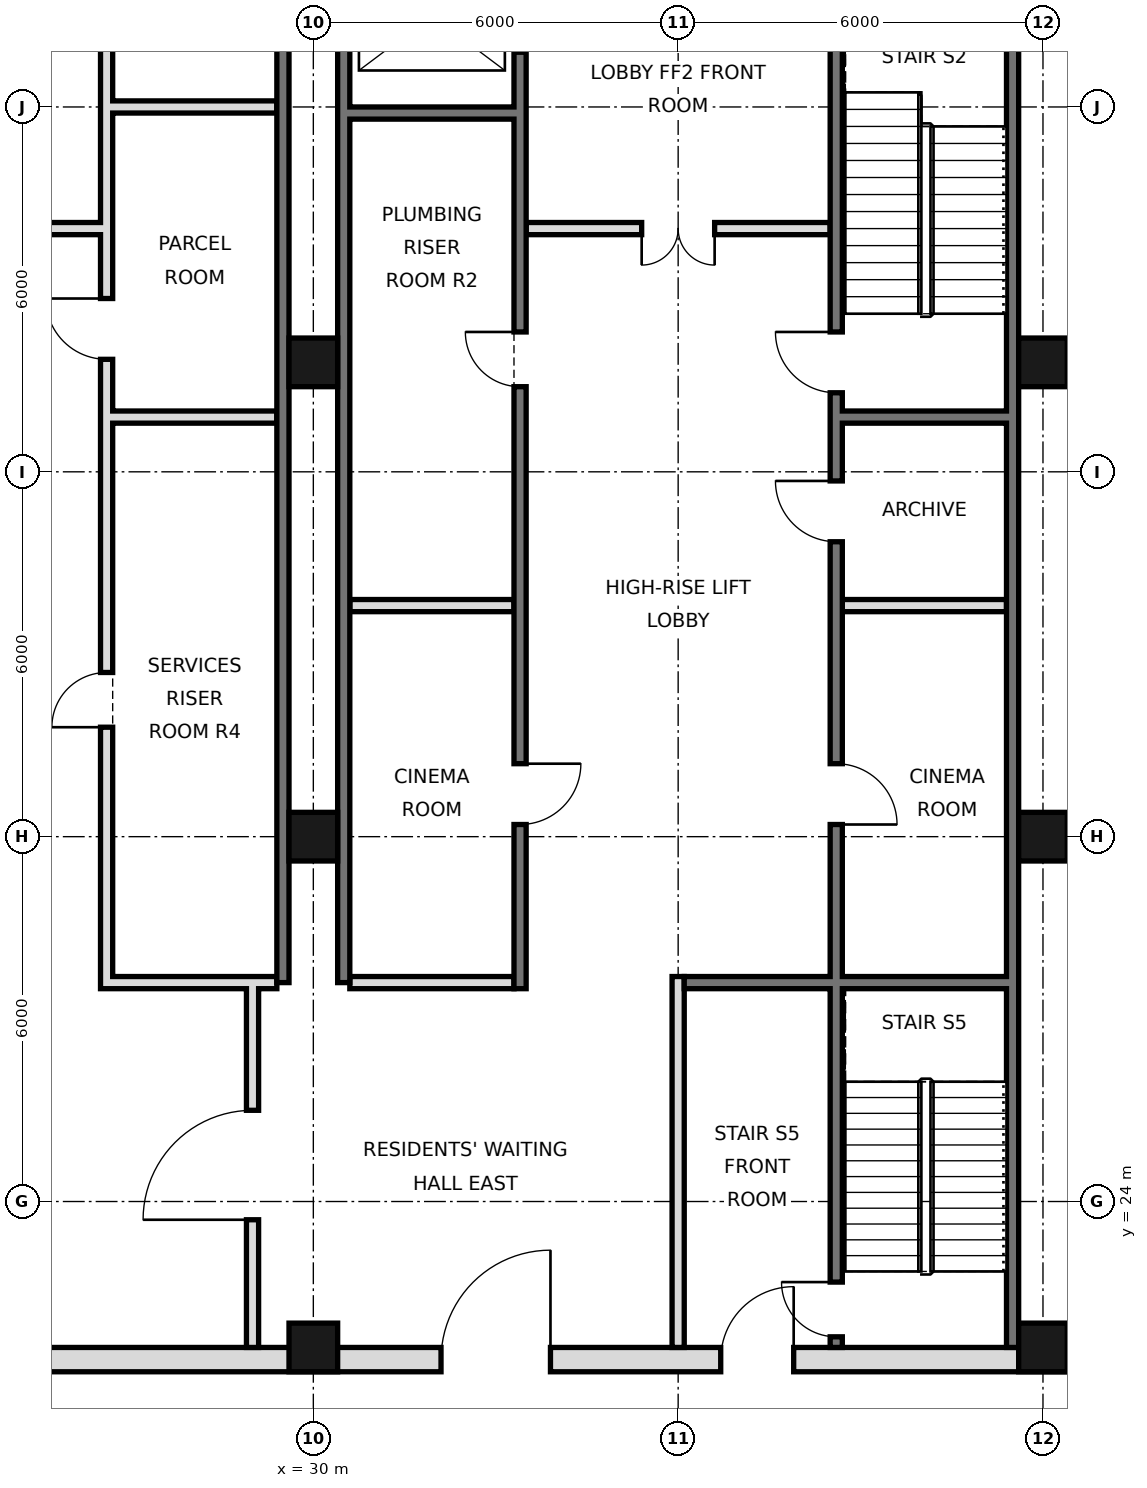
"""IFC4 building model, lengths in metres.
Left out: names, types, materials, properties, quantities, classifications, styles, units other than length and angle.
Written with IfcOpenShell. Run it as: python <this file> out.ifc"""

import sys

from ifc_helpers import new_model, si_unit, direction, frame, frame_2d, origin, origin_2d, place, context, subcontext, project, spatial, rectangle, hollow_rectangle, extrude, element, fill, save


model = new_model("IFC4")
c1 = context("Model", 3, precision=1e-05, world=origin(), true_north=direction((0.0, 1.0)))
c2 = subcontext(c1, "Body", "Model", "MODEL_VIEW")
j1 = project(units=[si_unit("LENGTHUNIT", "METRE"), si_unit("PLANEANGLEUNIT", "RADIAN")], contexts=[c1])
p1 = place(None, origin())
s1 = spatial("IfcSite", under=j1, at=p1, CompositionType="ELEMENT")
p2 = place(p1, origin())
s2 = spatial("IfcBuilding", under=s1, at=p2, CompositionType="ELEMENT")
p3 = place(p2, frame((0.0, 0.0, 85.8)))
s3 = spatial("IfcBuildingStorey", under=s2, at=p3, CompositionType="ELEMENT", Elevation=85.8)
for number, where, z_axis, x_axis in (
    (1, (30.0, 21.6, 0.0), (0.0, 0.0, 1.0), (1.0, 0.0, 0.0)),
    (2, (30.0, 30.0, 0.0), (0.0, 0.0, 1.0), (1.0, 0.0, 0.0)),
    (3, (30.0, 37.8, 0.0), (0.0, 0.0, 1.0), (1.0, 0.0, 0.0)),
    (4, (42.0, 21.6, 0.0), (0.0, 0.0, 1.0), (1.0, 0.0, 0.0)),
    (5, (42.0, 30.0, 0.0), (0.0, 0.0, 1.0), (1.0, 0.0, 0.0)),
    (6, (42.0, 37.8, 0.0), (0.0, 0.0, 1.0), (1.0, 0.0, 0.0)),
):
    element("IfcColumn", number, at=place(p3, frame(where, z_axis=z_axis, x_axis=x_axis)), inside=s3, PredefinedType="COLUMN", context=c2, shape_type="SweptSolid", body=[
        extrude(hollow_rectangle(XDim=0.8, YDim=0.8, WallThickness=0.06, at=origin_2d()), origin(), (0.0, 0.0, 1.0), 4.4),
    ])
p4 = place(p3, frame((41.5, 21.6, 0.0), z_axis=(0.0, 0.0, 1.0), x_axis=(0.0, 1.0, 0.0)))
e7 = element("IfcWall", 7, at=p4, inside=s3, PredefinedType="SOLIDWALL", context=c2, shape_type="SweptSolid", body=[
    extrude(rectangle(XDim=23.5, YDim=0.2, at=frame_2d((11.75, 0.0))), origin(), (0.0, 0.0, 1.0), 4.1),
])
for number, where, z_axis, x_axis in (
    (8, (29.5, 27.6, 0.0), (0.0, 0.0, 1.0), (0.0, 1.0, 0.0)),
    (9, (30.5, 27.6, 0.0), (0.0, 0.0, 1.0), (0.0, 1.0, 0.0)),
):
    element("IfcWall", number, at=place(p3, frame(where, z_axis=z_axis, x_axis=x_axis)), inside=s3, PredefinedType="SOLIDWALL", context=c2, shape_type="SweptSolid", body=[
        extrude(rectangle(XDim=17.5, YDim=0.2, at=frame_2d((8.75, 0.0))), origin(), (0.0, 0.0, 1.0), 4.1),
    ])
p5 = place(p3, frame((5.6, 21.4, 0.0), z_axis=(0.0, 0.0, 1.0), x_axis=(1.0, 0.0, 0.0)))
e10 = element("IfcWall", 10, at=p5, inside=s3, PredefinedType="SOLIDWALL", context=c2, shape_type="SweptSolid", body=[
    extrude(rectangle(XDim=36.8, YDim=0.4, at=frame_2d((18.4, 0.0))), origin(), (0.0, 0.0, 1.0), 4.1),
])
p6 = place(p5, frame((8.5, 0.0, 0.0)))
e11 = element("IfcOpeningElement", 11, at=p6, cuts=e10, PredefinedType="OPENING", context=c2, shape_type="SweptSolid", body=[
    extrude(rectangle(XDim=1.8, YDim=2.1, at=frame_2d((0.9, 1.05))), frame((0.0, 0.21, 0.0), z_axis=(0.0, -1.0, 0.0), x_axis=(1.0, 0.0, 0.0)), (0.0, 0.0, 1.0), 0.42),
])
p7 = place(p5, frame((17.5, 0.0, 0.0)))
e12 = element("IfcOpeningElement", 12, at=p7, cuts=e10, PredefinedType="OPENING", context=c2, shape_type="SweptSolid", body=[
    extrude(rectangle(XDim=1.8, YDim=2.1, at=frame_2d((0.9, 1.05))), frame((0.0, 0.21, 0.0), z_axis=(0.0, -1.0, 0.0), x_axis=(1.0, 0.0, 0.0)), (0.0, 0.0, 1.0), 0.42),
])
p8 = place(p5, frame((26.5, 0.0, 0.0)))
e13 = element("IfcOpeningElement", 13, at=p8, cuts=e10, PredefinedType="OPENING", context=c2, shape_type="SweptSolid", body=[
    extrude(rectangle(XDim=1.8, YDim=2.1, at=frame_2d((0.9, 1.05))), frame((0.0, 0.21, 0.0), z_axis=(0.0, -1.0, 0.0), x_axis=(1.0, 0.0, 0.0)), (0.0, 0.0, 1.0), 0.42),
])
p9 = place(p5, frame((4.5, 0.0, 0.0)))
e14 = element("IfcOpeningElement", 14, at=p9, cuts=e10, PredefinedType="OPENING", context=c2, shape_type="SweptSolid", body=[
    extrude(rectangle(XDim=1.2, YDim=2.1, at=frame_2d((0.6, 1.05))), frame((0.0, 0.21, 0.0), z_axis=(0.0, -1.0, 0.0), x_axis=(1.0, 0.0, 0.0)), (0.0, 0.0, 1.0), 0.42),
])
p10 = place(p5, frame((31.1, 0.0, 0.0)))
e15 = element("IfcOpeningElement", 15, at=p10, cuts=e10, PredefinedType="OPENING", context=c2, shape_type="SweptSolid", body=[
    extrude(rectangle(XDim=1.2, YDim=2.1, at=frame_2d((0.6, 1.05))), frame((0.0, 0.21, 0.0), z_axis=(0.0, -1.0, 0.0), x_axis=(1.0, 0.0, 0.0)), (0.0, 0.0, 1.0), 0.42),
])
p11 = place(p3, frame((29.0, 21.6, 0.0), z_axis=(0.0, 0.0, 1.0), x_axis=(0.0, 1.0, 0.0)))
e16 = element("IfcWall", 16, at=p11, inside=s3, PredefinedType="PARTITIONING", context=c2, shape_type="SweptSolid", body=[
    extrude(rectangle(XDim=6.0, YDim=0.2, at=frame_2d((3.0, 0.0))), origin(), (0.0, 0.0, 1.0), 4.1),
])
p12 = place(p11, frame((2.1, 0.0, 0.0)))
e17 = element("IfcOpeningElement", 17, at=p12, cuts=e16, PredefinedType="OPENING", context=c2, shape_type="SweptSolid", body=[
    extrude(rectangle(XDim=1.8, YDim=2.1, at=frame_2d((0.9, 1.05))), frame((0.0, 0.11, 0.0), z_axis=(0.0, -1.0, 0.0), x_axis=(1.0, 0.0, 0.0)), (0.0, 0.0, 1.0), 0.22),
])
p13 = place(p3, frame((26.6, 27.5, 0.0), z_axis=(0.0, 0.0, 1.0), x_axis=(0.0, 1.0, 0.0)))
e18 = element("IfcWall", 18, at=p13, inside=s3, PredefinedType="SOLIDWALL", context=c2, shape_type="SweptSolid", body=[
    extrude(rectangle(XDim=17.5, YDim=0.2, at=frame_2d((8.75, 0.0))), origin(), (0.0, 0.0, 1.0), 4.1),
])
p14 = place(p13, frame((4.3, 0.0, 0.0)))
e19 = element("IfcOpeningElement", 19, at=p14, cuts=e18, PredefinedType="OPENING", context=c2, shape_type="SweptSolid", body=[
    extrude(rectangle(XDim=0.9, YDim=2.1, at=frame_2d((0.45, 1.05))), frame((0.0, 0.11, 0.0), z_axis=(0.0, -1.0, 0.0), x_axis=(1.0, 0.0, 0.0)), (0.0, 0.0, 1.0), 0.22),
])
p15 = place(p13, frame((10.35, 0.0, 0.0)))
e20 = element("IfcOpeningElement", 20, at=p15, cuts=e18, PredefinedType="OPENING", context=c2, shape_type="SweptSolid", body=[
    extrude(rectangle(XDim=1.0, YDim=2.1, at=frame_2d((0.5, 1.05))), frame((0.0, 0.11, 0.0), z_axis=(0.0, -1.0, 0.0), x_axis=(1.0, 0.0, 0.0)), (0.0, 0.0, 1.0), 0.22),
])
p16 = place(p13, frame((15.475, 0.0, 0.0)))
e21 = element("IfcOpeningElement", 21, at=p16, cuts=e18, PredefinedType="OPENING", context=c2, shape_type="SweptSolid", body=[
    extrude(rectangle(XDim=1.0, YDim=2.1, at=frame_2d((0.5, 1.05))), frame((0.0, 0.11, 0.0), z_axis=(0.0, -1.0, 0.0), x_axis=(1.0, 0.0, 0.0)), (0.0, 0.0, 1.0), 0.22),
])
p17 = place(p3, frame((33.4, 27.5, 0.0), z_axis=(0.0, 0.0, 1.0), x_axis=(0.0, 1.0, 0.0)))
e22 = element("IfcWall", 22, at=p17, inside=s3, PredefinedType="SOLIDWALL", context=c2, shape_type="SweptSolid", body=[
    extrude(rectangle(XDim=17.5, YDim=0.2, at=frame_2d((8.75, 0.0))), origin(), (0.0, 0.0, 1.0), 4.1),
])
p18 = place(p17, frame((15.4, 0.0, 0.0)))
e23 = element("IfcOpeningElement", 23, at=p18, cuts=e22, PredefinedType="OPENING", context=c2, shape_type="SweptSolid", body=[
    extrude(rectangle(XDim=1.1, YDim=2.1, at=frame_2d((0.55, 1.05))), frame((0.0, 0.11, 0.0), z_axis=(0.0, -1.0, 0.0), x_axis=(1.0, 0.0, 0.0)), (0.0, 0.0, 1.0), 0.22),
])
p19 = place(p17, frame((2.7, 0.0, 0.0)))
e24 = element("IfcOpeningElement", 24, at=p19, cuts=e22, PredefinedType="OPENING", context=c2, shape_type="SweptSolid", body=[
    extrude(rectangle(XDim=1.0, YDim=2.1, at=frame_2d((0.5, 1.05))), frame((0.0, 0.11, 0.0), z_axis=(0.0, -1.0, 0.0), x_axis=(1.0, 0.0, 0.0)), (0.0, 0.0, 1.0), 0.22),
])
p20 = place(p17, frame((9.9, 0.0, 0.0)))
e25 = element("IfcOpeningElement", 25, at=p20, cuts=e22, PredefinedType="OPENING", context=c2, shape_type="SweptSolid", body=[
    extrude(rectangle(XDim=0.9, YDim=2.1, at=frame_2d((0.45, 1.05))), frame((0.0, 0.11, 0.0), z_axis=(0.0, -1.0, 0.0), x_axis=(1.0, 0.0, 0.0)), (0.0, 0.0, 1.0), 0.22),
])
p21 = place(p3, frame((36.0, 21.6, 0.0), z_axis=(0.0, 0.0, 1.0), x_axis=(0.0, 1.0, 0.0)))
e26 = element("IfcWall", 26, at=p21, inside=s3, PredefinedType="PARTITIONING", context=c2, shape_type="SweptSolid", body=[
    extrude(rectangle(XDim=6.1, YDim=0.2, at=frame_2d((3.05, 0.0))), origin(), (0.0, 0.0, 1.0), 4.1),
])
p22 = place(p3, frame((38.6, 21.6, 0.0), z_axis=(0.0, 0.0, 1.0), x_axis=(0.0, 1.0, 0.0)))
e27 = element("IfcWall", 27, at=p22, inside=s3, PredefinedType="SOLIDWALL", context=c2, shape_type="SweptSolid", body=[
    extrude(rectangle(XDim=23.4, YDim=0.2, at=frame_2d((11.7, 0.0))), origin(), (0.0, 0.0, 1.0), 4.1),
])
p23 = place(p22, frame((8.6, 0.0, 0.0)))
e28 = element("IfcOpeningElement", 28, at=p23, cuts=e27, PredefinedType="OPENING", context=c2, shape_type="SweptSolid", body=[
    extrude(rectangle(XDim=1.0, YDim=2.1, at=frame_2d((0.5, 1.05))), frame((0.0, 0.11, 0.0), z_axis=(0.0, -1.0, 0.0), x_axis=(1.0, 0.0, 0.0)), (0.0, 0.0, 1.0), 0.22),
])
p24 = place(p22, frame((13.25, 0.0, 0.0)))
e29 = element("IfcOpeningElement", 29, at=p24, cuts=e27, PredefinedType="OPENING", context=c2, shape_type="SweptSolid", body=[
    extrude(rectangle(XDim=1.0, YDim=2.1, at=frame_2d((0.5, 1.05))), frame((0.0, 0.11, 0.0), z_axis=(0.0, -1.0, 0.0), x_axis=(1.0, 0.0, 0.0)), (0.0, 0.0, 1.0), 0.22),
])
p25 = place(p22, frame((15.7, 0.0, 0.0)))
e30 = element("IfcOpeningElement", 30, at=p25, cuts=e27, PredefinedType="OPENING", context=c2, shape_type="SweptSolid", body=[
    extrude(rectangle(XDim=1.0, YDim=2.1, at=frame_2d((0.5, 1.05))), frame((0.0, 0.11, 0.0), z_axis=(0.0, -1.0, 0.0), x_axis=(1.0, 0.0, 0.0)), (0.0, 0.0, 1.0), 0.22),
])
p26 = place(p22, frame((0.175, 0.0, 0.0)))
e31 = element("IfcOpeningElement", 31, at=p26, cuts=e27, PredefinedType="OPENING", context=c2, shape_type="SweptSolid", body=[
    extrude(rectangle(XDim=0.9, YDim=2.1, at=frame_2d((0.45, 1.05))), frame((0.0, 0.11, 0.0), z_axis=(0.0, -1.0, 0.0), x_axis=(1.0, 0.0, 0.0)), (0.0, 0.0, 1.0), 0.22),
])
p27 = place(p3, frame((26.7, 27.6, 0.0), z_axis=(0.0, 0.0, 1.0), x_axis=(1.0, 0.0, 0.0)))
e32 = element("IfcWall", 32, at=p27, inside=s3, PredefinedType="SOLIDWALL", context=c2, shape_type="SweptSolid", body=[
    extrude(rectangle(XDim=2.7, YDim=0.2, at=frame_2d((1.35, 0.0))), origin(), (0.0, 0.0, 1.0), 4.1),
])
p28 = place(p3, frame((30.6, 27.6, 0.0), z_axis=(0.0, 0.0, 1.0), x_axis=(1.0, 0.0, 0.0)))
e33 = element("IfcWall", 33, at=p28, inside=s3, PredefinedType="PARTITIONING", context=c2, shape_type="SweptSolid", body=[
    extrude(rectangle(XDim=2.7, YDim=0.2, at=frame_2d((1.35, 0.0))), origin(), (0.0, 0.0, 1.0), 4.1),
])
p29 = place(p3, frame((36.1, 27.6, 0.0), z_axis=(0.0, 0.0, 1.0), x_axis=(1.0, 0.0, 0.0)))
e34 = element("IfcWall", 34, at=p29, inside=s3, PredefinedType="SOLIDWALL", context=c2, shape_type="SweptSolid", body=[
    extrude(rectangle(XDim=5.3, YDim=0.2, at=frame_2d((2.65, 0.0))), origin(), (0.0, 0.0, 1.0), 4.1),
])
p30 = place(p3, frame((30.6, 33.8, 0.0), z_axis=(0.0, 0.0, 1.0), x_axis=(1.0, 0.0, 0.0)))
e35 = element("IfcWall", 35, at=p30, inside=s3, PredefinedType="SOLIDWALL", context=c2, shape_type="SweptSolid", body=[
    extrude(rectangle(XDim=2.7, YDim=0.2, at=frame_2d((1.35, 0.0))), origin(), (0.0, 0.0, 1.0), 4.1),
])
p31 = place(p3, frame((38.7, 33.8, 0.0), z_axis=(0.0, 0.0, 1.0), x_axis=(1.0, 0.0, 0.0)))
e36 = element("IfcWall", 36, at=p31, inside=s3, PredefinedType="PARTITIONING", context=c2, shape_type="SweptSolid", body=[
    extrude(rectangle(XDim=2.7, YDim=0.2, at=frame_2d((1.35, 0.0))), origin(), (0.0, 0.0, 1.0), 4.1),
])
for number, where, z_axis, x_axis in (
    (37, (26.7, 36.9, 0.0), (0.0, 0.0, 1.0), (1.0, 0.0, 0.0)),
    (38, (38.7, 36.9, 0.0), (0.0, 0.0, 1.0), (1.0, 0.0, 0.0)),
):
    element("IfcWall", number, at=place(p3, frame(where, z_axis=z_axis, x_axis=x_axis)), inside=s3, PredefinedType="SOLIDWALL", context=c2, shape_type="SweptSolid", body=[
        extrude(rectangle(XDim=2.7, YDim=0.2, at=frame_2d((1.35, 0.0))), origin(), (0.0, 0.0, 1.0), 4.1),
    ])
p32 = place(p3, frame((21.5, 40.0, 0.0), z_axis=(0.0, 0.0, 1.0), x_axis=(1.0, 0.0, 0.0)))
e39 = element("IfcWall", 39, at=p32, inside=s3, PredefinedType="PARTITIONING", context=c2, shape_type="SweptSolid", body=[
    extrude(rectangle(XDim=5.0, YDim=0.2, at=frame_2d((2.5, 0.0))), origin(), (0.0, 0.0, 1.0), 4.1),
])
p33 = place(p32, frame((1.9, 0.0, 0.0)))
e40 = element("IfcOpeningElement", 40, at=p33, cuts=e39, PredefinedType="OPENING", context=c2, shape_type="SweptSolid", body=[
    extrude(rectangle(XDim=1.2, YDim=2.1, at=frame_2d((0.6, 1.05))), frame((0.0, 0.11, 0.0), z_axis=(0.0, -1.0, 0.0), x_axis=(1.0, 0.0, 0.0)), (0.0, 0.0, 1.0), 0.22),
])
p34 = place(p3, frame((33.5, 40.0, 0.0), z_axis=(0.0, 0.0, 1.0), x_axis=(1.0, 0.0, 0.0)))
e41 = element("IfcWall", 41, at=p34, inside=s3, PredefinedType="PARTITIONING", context=c2, shape_type="SweptSolid", body=[
    extrude(rectangle(XDim=5.0, YDim=0.2, at=frame_2d((2.5, 0.0))), origin(), (0.0, 0.0, 1.0), 4.1),
])
p35 = place(p34, frame((1.9, 0.0, 0.0)))
e42 = element("IfcOpeningElement", 42, at=p35, cuts=e41, PredefinedType="OPENING", context=c2, shape_type="SweptSolid", body=[
    extrude(rectangle(XDim=1.2, YDim=2.1, at=frame_2d((0.6, 1.05))), frame((0.0, 0.11, 0.0), z_axis=(0.0, -1.0, 0.0), x_axis=(1.0, 0.0, 0.0)), (0.0, 0.0, 1.0), 0.22),
])
p36 = place(p3, frame((30.6, 41.9, 0.0), z_axis=(0.0, 0.0, 1.0), x_axis=(1.0, 0.0, 0.0)))
e43 = element("IfcWall", 43, at=p36, inside=s3, PredefinedType="SOLIDWALL", context=c2, shape_type="SweptSolid", body=[
    extrude(rectangle(XDim=2.7, YDim=0.2, at=frame_2d((1.35, 0.0))), origin(), (0.0, 0.0, 1.0), 4.1),
])
p37 = place(p3, frame((26.7, 42.0, 0.0), z_axis=(0.0, 0.0, 1.0), x_axis=(1.0, 0.0, 0.0)))
e44 = element("IfcWall", 44, at=p37, inside=s3, PredefinedType="PARTITIONING", context=c2, shape_type="SweptSolid", body=[
    extrude(rectangle(XDim=2.7, YDim=0.2, at=frame_2d((1.35, 0.0))), origin(), (0.0, 0.0, 1.0), 4.1),
])
p38 = place(p12, origin())
e45 = element("IfcDoor", 45, at=p38, inside=s3, OperationType="SINGLE_SWING_LEFT", PredefinedType="DOOR", context=c2, shape_type="SweptSolid", body=[
    extrude(rectangle(XDim=1.8, YDim=2.1, at=frame_2d((0.9, 1.05))), frame((0.0, 0.025, 0.0), z_axis=(0.0, -1.0, 0.0), x_axis=(1.0, 0.0, 0.0)), (0.0, 0.0, 1.0), 0.05),
])
fill(e17, e45)
p39 = place(p8, frame((1.8, 0.0, 0.0), z_axis=(0.0, 0.0, 1.0), x_axis=(-1.0, 0.0, 0.0)))
e46 = element("IfcDoor", 46, at=p39, inside=s3, OperationType="SINGLE_SWING_LEFT", PredefinedType="DOOR", context=c2, shape_type="SweptSolid", body=[
    extrude(rectangle(XDim=1.8, YDim=2.1, at=frame_2d((0.9, 1.05))), frame((0.0, 0.025, 0.0), z_axis=(0.0, -1.0, 0.0), x_axis=(1.0, 0.0, 0.0)), (0.0, 0.0, 1.0), 0.05),
])
fill(e13, e46)
p40 = place(p10, frame((1.2, 0.0, 0.0), z_axis=(0.0, 0.0, 1.0), x_axis=(-1.0, 0.0, 0.0)))
e47 = element("IfcDoor", 47, at=p40, inside=s3, OperationType="SINGLE_SWING_LEFT", PredefinedType="DOOR", context=c2, shape_type="SweptSolid", body=[
    extrude(rectangle(XDim=1.2, YDim=2.1, at=frame_2d((0.6, 1.05))), frame((0.0, 0.025, 0.0), z_axis=(0.0, -1.0, 0.0), x_axis=(1.0, 0.0, 0.0)), (0.0, 0.0, 1.0), 0.05),
])
fill(e15, e47)
p41 = place(p35, frame((1.2, 0.0, 0.0), z_axis=(0.0, 0.0, 1.0), x_axis=(-1.0, 0.0, 0.0)))
e48 = element("IfcDoor", 48, at=p41, inside=s3, OperationType="DOUBLE_DOOR_SINGLE_SWING", PredefinedType="DOOR", context=c2, shape_type="SweptSolid", body=[
    extrude(rectangle(XDim=1.2, YDim=2.1, at=frame_2d((0.6, 1.05))), frame((0.0, 0.025, 0.0), z_axis=(0.0, -1.0, 0.0), x_axis=(1.0, 0.0, 0.0)), (0.0, 0.0, 1.0), 0.05),
])
fill(e42, e48)
p42 = place(p23, frame((1.0, 0.0, 0.0), z_axis=(0.0, 0.0, 1.0), x_axis=(-1.0, 0.0, 0.0)))
e49 = element("IfcDoor", 49, at=p42, inside=s3, OperationType="SINGLE_SWING_RIGHT", PredefinedType="DOOR", context=c2, shape_type="SweptSolid", body=[
    extrude(rectangle(XDim=1.0, YDim=2.1, at=frame_2d((0.5, 1.05))), frame((0.0, 0.025, 0.0), z_axis=(0.0, -1.0, 0.0), x_axis=(1.0, 0.0, 0.0)), (0.0, 0.0, 1.0), 0.05),
])
fill(e28, e49)
p43 = place(p24, frame((1.0, 0.0, 0.0), z_axis=(0.0, 0.0, 1.0), x_axis=(-1.0, 0.0, 0.0)))
e50 = element("IfcDoor", 50, at=p43, inside=s3, OperationType="SINGLE_SWING_LEFT", PredefinedType="DOOR", context=c2, shape_type="SweptSolid", body=[
    extrude(rectangle(XDim=1.0, YDim=2.1, at=frame_2d((0.5, 1.05))), frame((0.0, 0.025, 0.0), z_axis=(0.0, -1.0, 0.0), x_axis=(1.0, 0.0, 0.0)), (0.0, 0.0, 1.0), 0.05),
])
fill(e29, e50)
p44 = place(p19, origin())
e51 = element("IfcDoor", 51, at=p44, inside=s3, OperationType="SINGLE_SWING_RIGHT", PredefinedType="DOOR", context=c2, shape_type="SweptSolid", body=[
    extrude(rectangle(XDim=1.0, YDim=2.1, at=frame_2d((0.5, 1.05))), frame((0.0, 0.025, 0.0), z_axis=(0.0, -1.0, 0.0), x_axis=(1.0, 0.0, 0.0)), (0.0, 0.0, 1.0), 0.05),
])
fill(e24, e51)
p45 = place(p25, frame((1.0, 0.0, 0.0), z_axis=(0.0, 0.0, 1.0), x_axis=(-1.0, 0.0, 0.0)))
e52 = element("IfcDoor", 52, at=p45, inside=s3, OperationType="SINGLE_SWING_LEFT", PredefinedType="DOOR", context=c2, shape_type="SweptSolid", body=[
    extrude(rectangle(XDim=1.0, YDim=2.1, at=frame_2d((0.5, 1.05))), frame((0.0, 0.025, 0.0), z_axis=(0.0, -1.0, 0.0), x_axis=(1.0, 0.0, 0.0)), (0.0, 0.0, 1.0), 0.05),
])
fill(e30, e52)
p46 = place(p26, frame((0.9, 0.0, 0.0), z_axis=(0.0, 0.0, 1.0), x_axis=(-1.0, 0.0, 0.0)))
e53 = element("IfcDoor", 53, at=p46, inside=s3, OperationType="SINGLE_SWING_LEFT", PredefinedType="DOOR", context=c2, shape_type="SweptSolid", body=[
    extrude(rectangle(XDim=0.9, YDim=2.1, at=frame_2d((0.45, 1.05))), frame((0.0, 0.025, 0.0), z_axis=(0.0, -1.0, 0.0), x_axis=(1.0, 0.0, 0.0)), (0.0, 0.0, 1.0), 0.05),
])
fill(e31, e53)
p47 = place(p20, frame((0.9, 0.0, 0.0), z_axis=(0.0, 0.0, 1.0), x_axis=(-1.0, 0.0, 0.0)))
e54 = element("IfcDoor", 54, at=p47, inside=s3, OperationType="SINGLE_SWING_LEFT", PredefinedType="DOOR", context=c2, shape_type="SweptSolid", body=[
    extrude(rectangle(XDim=0.9, YDim=2.1, at=frame_2d((0.45, 1.05))), frame((0.0, 0.025, 0.0), z_axis=(0.0, -1.0, 0.0), x_axis=(1.0, 0.0, 0.0)), (0.0, 0.0, 1.0), 0.05),
])
fill(e25, e54)
p48 = place(p14, origin())
e55 = element("IfcDoor", 55, at=p48, inside=s3, OperationType="SINGLE_SWING_LEFT", PredefinedType="DOOR", context=c2, shape_type="SweptSolid", body=[
    extrude(rectangle(XDim=0.9, YDim=2.1, at=frame_2d((0.45, 1.05))), frame((0.0, 0.025, 0.0), z_axis=(0.0, -1.0, 0.0), x_axis=(1.0, 0.0, 0.0)), (0.0, 0.0, 1.0), 0.05),
])
fill(e19, e55)
p49 = place(p15, frame((1.0, 0.0, 0.0), z_axis=(0.0, 0.0, 1.0), x_axis=(-1.0, 0.0, 0.0)))
e56 = element("IfcDoor", 56, at=p49, inside=s3, OperationType="SINGLE_SWING_LEFT", PredefinedType="DOOR", context=c2, shape_type="SweptSolid", body=[
    extrude(rectangle(XDim=1.0, YDim=2.1, at=frame_2d((0.5, 1.05))), frame((0.0, 0.025, 0.0), z_axis=(0.0, -1.0, 0.0), x_axis=(1.0, 0.0, 0.0)), (0.0, 0.0, 1.0), 0.05),
])
fill(e20, e56)
save(model, sys.argv[1])
